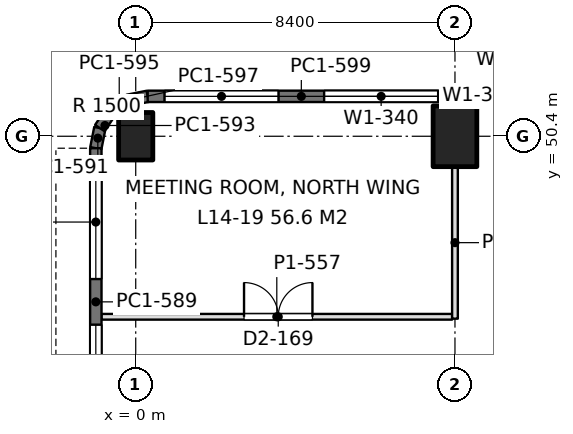
"""IFC4 building model, lengths in metres.
Left out: names, types, materials, properties, quantities, classifications, styles, units other than length and angle.
Written with IfcOpenShell. Run it as: python <this file> out.ifc"""

import sys

from ifc_helpers import new_model, si_unit, direction, frame, frame_2d, origin, origin_2d, place, context, subcontext, project, spatial, rectangle, extrude, element, fill, save


model = new_model("IFC4")
c1 = context("Model", 3, precision=1e-05, world=origin(), true_north=direction((0.0, 1.0)))
c2 = subcontext(c1, "Body", "Model", "MODEL_VIEW")
j1 = project(units=[si_unit("LENGTHUNIT", "METRE"), si_unit("PLANEANGLEUNIT", "RADIAN")], contexts=[c1])
p1 = place(None, origin())
s1 = spatial("IfcSite", under=j1, at=p1, CompositionType="ELEMENT")
p2 = place(p1, origin())
s2 = spatial("IfcBuilding", under=s1, at=p2, CompositionType="ELEMENT")
p3 = place(p2, frame((0.0, 0.0, 63.9)))
s3 = spatial("IfcBuildingStorey", under=s2, at=p3, CompositionType="ELEMENT", Elevation=63.9)
p4 = place(p3, frame((0.0, 50.4, 0.0), z_axis=(0.0, 0.0, 1.0), x_axis=(1.0, 0.0, 0.0)))
e1 = element("IfcColumn", 1, at=p4, inside=s3, PredefinedType="COLUMN", context=c2, shape_type="SweptSolid", body=[
    extrude(rectangle(XDim=0.9, YDim=1.25, at=origin_2d()), origin(), (0.0, 0.0, 1.0), 4.5),
])
p5 = place(p3, frame((8.4, 50.4, 0.0), z_axis=(0.0, 0.0, 1.0), x_axis=(1.0, 0.0, 0.0)))
e2 = element("IfcColumn", 2, at=p5, inside=s3, PredefinedType="COLUMN", context=c2, shape_type="SweptSolid", body=[
    extrude(rectangle(XDim=1.15, YDim=1.6, at=origin_2d()), origin(), (0.0, 0.0, 1.0), 4.5),
])
p6 = place(p3, frame((-1.05, 42.0, 0.0), z_axis=(0.0, 0.0, 1.0), x_axis=(0.0, 1.0, 0.0)))
e3 = element("IfcWall", 3, at=p6, inside=s3, PredefinedType="SOLIDWALL", context=c2, shape_type="SweptSolid", body=[
    extrude(rectangle(XDim=8.085, YDim=0.3, at=frame_2d((4.042, 0.0))), origin(), (0.0, 0.0, 1.0), 4.34),
])
p7 = place(p6, frame((0.443, 0.0, 0.9)))
e4 = element("IfcOpeningElement", 4, at=p7, cuts=e3, PredefinedType="OPENING", context=c2, shape_type="SweptSolid", body=[
    extrude(rectangle(XDim=3.0, YDim=1.9, at=frame_2d((1.5, 0.95))), frame((0.0, 0.16, 0.0), z_axis=(0.0, -1.0, 0.0), x_axis=(1.0, 0.0, 0.0)), (0.0, 0.0, 1.0), 0.32),
])
p8 = place(p6, frame((4.643, 0.0, 0.9)))
e5 = element("IfcOpeningElement", 5, at=p8, cuts=e3, PredefinedType="OPENING", context=c2, shape_type="SweptSolid", body=[
    extrude(rectangle(XDim=3.0, YDim=1.9, at=frame_2d((1.5, 0.95))), frame((0.0, 0.16, 0.0), z_axis=(0.0, -1.0, 0.0), x_axis=(1.0, 0.0, 0.0)), (0.0, 0.0, 1.0), 0.32),
])
p9 = place(p3, frame((-1.05, 50.085, 0.0), z_axis=(0.0, 0.0, 1.0), x_axis=(0.195073962632, 0.980788534345, 0.0)))
e6 = element("IfcWall", 6, at=p9, inside=s3, PredefinedType="SOLIDWALL", context=c2, shape_type="SweptSolid", body=[
    extrude(rectangle(XDim=0.541, YDim=0.3, at=frame_2d((0.271, 0.0))), origin(), (0.0, 0.0, 1.0), 4.34),
])
for number, where, z_axis, x_axis in (
    (7, (-0.945, 50.615, 0.0), (0.0, 0.0, 1.0), (0.556, 0.831, 0.0)),
    (8, (-0.653, 51.052, 0.0), (0.0, 0.0, 1.0), (0.831, 0.556, 0.0)),
):
    element("IfcWall", number, at=place(p3, frame(where, z_axis=z_axis, x_axis=x_axis)), inside=s3, PredefinedType="SOLIDWALL", context=c2, shape_type="SweptSolid", body=[
        extrude(rectangle(XDim=0.526, YDim=0.3, at=frame_2d((0.263, 0.0))), origin(), (0.0, 0.0, 1.0), 4.34),
    ])
p10 = place(p3, frame((-0.216, 51.344, 0.0), z_axis=(0.0, 0.0, 1.0), x_axis=(0.980788534345, 0.195073962632, 0.0)))
e9 = element("IfcWall", 9, at=p10, inside=s3, PredefinedType="SOLIDWALL", context=c2, shape_type="SweptSolid", body=[
    extrude(rectangle(XDim=0.541, YDim=0.3, at=frame_2d((0.271, 0.0))), origin(), (0.0, 0.0, 1.0), 4.34),
])
p11 = place(p3, frame((0.315, 51.45, 0.0), z_axis=(0.0, 0.0, 1.0), x_axis=(1.0, 0.0, 0.0)))
e10 = element("IfcWall", 10, at=p11, inside=s3, PredefinedType="SOLIDWALL", context=c2, shape_type="SweptSolid", body=[
    extrude(rectangle(XDim=8.085, YDim=0.3, at=frame_2d((4.042, 0.0))), origin(), (0.0, 0.0, 1.0), 4.34),
])
p12 = place(p11, frame((0.443, 0.0, 0.9)))
e11 = element("IfcOpeningElement", 11, at=p12, cuts=e10, PredefinedType="OPENING", context=c2, shape_type="SweptSolid", body=[
    extrude(rectangle(XDim=3.0, YDim=1.9, at=frame_2d((1.5, 0.95))), frame((0.0, 0.16, 0.0), z_axis=(0.0, -1.0, 0.0), x_axis=(1.0, 0.0, 0.0)), (0.0, 0.0, 1.0), 0.32),
])
p13 = place(p11, frame((4.643, 0.0, 0.9)))
e12 = element("IfcOpeningElement", 12, at=p13, cuts=e10, PredefinedType="OPENING", context=c2, shape_type="SweptSolid", body=[
    extrude(rectangle(XDim=3.0, YDim=1.9, at=frame_2d((1.5, 0.95))), frame((0.0, 0.16, 0.0), z_axis=(0.0, -1.0, 0.0), x_axis=(1.0, 0.0, 0.0)), (0.0, 0.0, 1.0), 0.32),
])
p14 = place(p3, frame((8.4, 51.45, 0.0), z_axis=(0.0, 0.0, 1.0), x_axis=(1.0, 0.0, 0.0)))
e13 = element("IfcWall", 13, at=p14, inside=s3, PredefinedType="SOLIDWALL", context=c2, shape_type="SweptSolid", body=[
    extrude(rectangle(XDim=8.4, YDim=0.3, at=frame_2d((4.2, 0.0))), origin(), (0.0, 0.0, 1.0), 4.34),
])
p15 = place(p14, frame((0.6, 0.0, 0.9)))
e14 = element("IfcOpeningElement", 14, at=p15, cuts=e13, PredefinedType="OPENING", context=c2, shape_type="SweptSolid", body=[
    extrude(rectangle(XDim=3.0, YDim=1.9, at=frame_2d((1.5, 0.95))), frame((0.0, 0.16, 0.0), z_axis=(0.0, -1.0, 0.0), x_axis=(1.0, 0.0, 0.0)), (0.0, 0.0, 1.0), 0.32),
])
p16 = place(p14, frame((4.8, 0.0, 0.9)))
e15 = element("IfcOpeningElement", 15, at=p16, cuts=e13, PredefinedType="OPENING", context=c2, shape_type="SweptSolid", body=[
    extrude(rectangle(XDim=3.0, YDim=1.9, at=frame_2d((1.5, 0.95))), frame((0.0, 0.16, 0.0), z_axis=(0.0, -1.0, 0.0), x_axis=(1.0, 0.0, 0.0)), (0.0, 0.0, 1.0), 0.32),
])
p17 = place(p3, frame((-0.902, 45.65, 0.0), z_axis=(0.0, 0.0, 1.0), x_axis=(1.0, 0.0, 0.0)))
e16 = element("IfcWall", 16, at=p17, inside=s3, PredefinedType="PARTITIONING", context=c2, shape_type="SweptSolid", body=[
    extrude(rectangle(XDim=9.228, YDim=0.15, at=frame_2d((4.614, 0.0))), origin(), (0.0, 0.0, 1.0), 3.74),
])
p18 = place(p17, frame((3.752, 0.0, 0.0)))
e17 = element("IfcOpeningElement", 17, at=p18, cuts=e16, PredefinedType="OPENING", context=c2, shape_type="SweptSolid", body=[
    extrude(rectangle(XDim=1.8, YDim=2.2, at=frame_2d((0.9, 1.1))), frame((0.0, 0.085, 0.0), z_axis=(0.0, -1.0, 0.0), x_axis=(1.0, 0.0, 0.0)), (0.0, 0.0, 1.0), 0.17),
])
p19 = place(p3, frame((8.4, 45.6, 0.0), z_axis=(0.0, 0.0, 1.0), x_axis=(0.0, 1.0, 0.0)))
e18 = element("IfcWall", 18, at=p19, inside=s3, PredefinedType="PARTITIONING", context=c2, shape_type="SweptSolid", body=[
    extrude(rectangle(XDim=4.001, YDim=0.15, at=frame_2d((2.0, 0.0))), origin(), (0.0, 0.0, 1.0), 3.74),
])
p20 = place(p7, origin())
e19 = element("IfcWindow", 19, at=p20, inside=s3, PartitioningType="SINGLE_PANEL", PredefinedType="WINDOW", context=c2, shape_type="SweptSolid", body=[
    extrude(rectangle(XDim=3.0, YDim=1.9, at=frame_2d((1.5, 0.95))), frame((0.0, 0.03, 0.0), z_axis=(0.0, -1.0, 0.0), x_axis=(1.0, 0.0, 0.0)), (0.0, 0.0, 1.0), 0.06),
])
fill(e4, e19)
p21 = place(p8, origin())
e20 = element("IfcWindow", 20, at=p21, inside=s3, PartitioningType="SINGLE_PANEL", PredefinedType="WINDOW", context=c2, shape_type="SweptSolid", body=[
    extrude(rectangle(XDim=3.0, YDim=1.9, at=frame_2d((1.5, 0.95))), frame((0.0, 0.03, 0.0), z_axis=(0.0, -1.0, 0.0), x_axis=(1.0, 0.0, 0.0)), (0.0, 0.0, 1.0), 0.06),
])
fill(e5, e20)
p22 = place(p12, origin())
e21 = element("IfcWindow", 21, at=p22, inside=s3, PartitioningType="SINGLE_PANEL", PredefinedType="WINDOW", context=c2, shape_type="SweptSolid", body=[
    extrude(rectangle(XDim=3.0, YDim=1.9, at=frame_2d((1.5, 0.95))), frame((0.0, 0.03, 0.0), z_axis=(0.0, -1.0, 0.0), x_axis=(1.0, 0.0, 0.0)), (0.0, 0.0, 1.0), 0.06),
])
fill(e11, e21)
p23 = place(p13, origin())
e22 = element("IfcWindow", 22, at=p23, inside=s3, PartitioningType="SINGLE_PANEL", PredefinedType="WINDOW", context=c2, shape_type="SweptSolid", body=[
    extrude(rectangle(XDim=3.0, YDim=1.9, at=frame_2d((1.5, 0.95))), frame((0.0, 0.03, 0.0), z_axis=(0.0, -1.0, 0.0), x_axis=(1.0, 0.0, 0.0)), (0.0, 0.0, 1.0), 0.06),
])
fill(e12, e22)
p24 = place(p15, origin())
e23 = element("IfcWindow", 23, at=p24, inside=s3, PartitioningType="SINGLE_PANEL", PredefinedType="WINDOW", context=c2, shape_type="SweptSolid", body=[
    extrude(rectangle(XDim=3.0, YDim=1.9, at=frame_2d((1.5, 0.95))), frame((0.0, 0.03, 0.0), z_axis=(0.0, -1.0, 0.0), x_axis=(1.0, 0.0, 0.0)), (0.0, 0.0, 1.0), 0.06),
])
fill(e14, e23)
p25 = place(p18, origin())
e24 = element("IfcDoor", 24, at=p25, inside=s3, OperationType="DOUBLE_DOOR_SINGLE_SWING", PredefinedType="DOOR", context=c2, shape_type="SweptSolid", body=[
    extrude(rectangle(XDim=1.8, YDim=2.2, at=frame_2d((0.9, 1.1))), frame((0.0, 0.025, 0.0), z_axis=(0.0, -1.0, 0.0), x_axis=(1.0, 0.0, 0.0)), (0.0, 0.0, 1.0), 0.05),
])
fill(e17, e24)
save(model, sys.argv[1])
